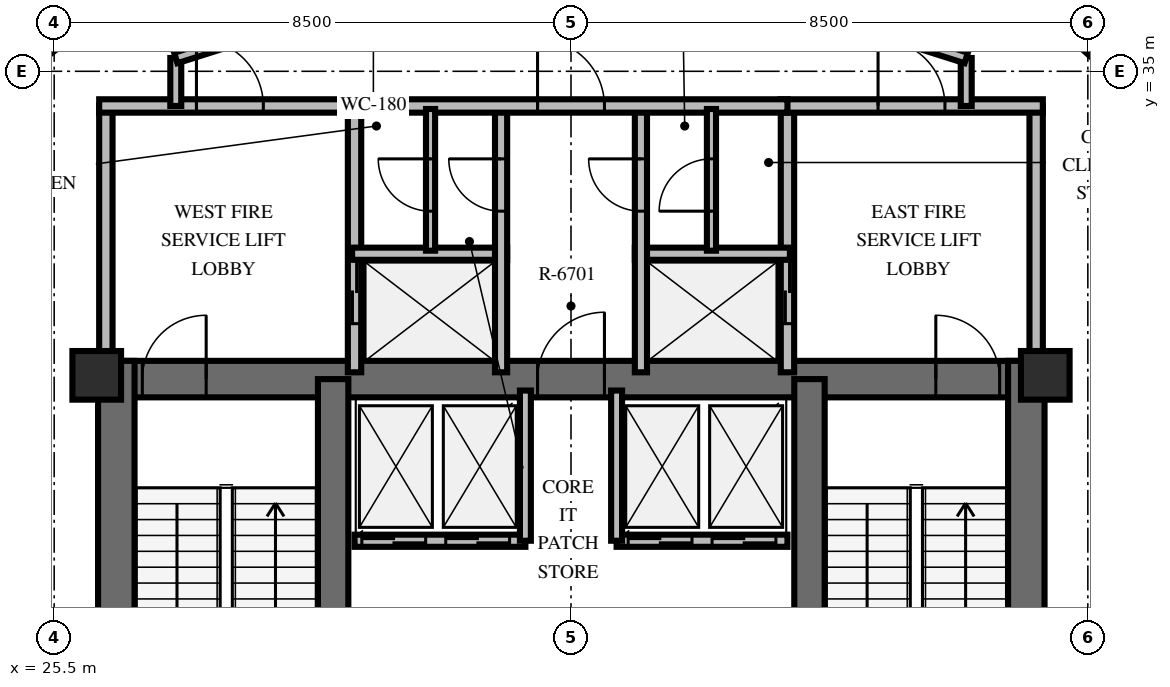
"""IFC4 building model, lengths in metres.
Left out: names, types, materials, properties, quantities, classifications, styles, units other than length and angle.
Written with IfcOpenShell. Run it as: python <this file> out.ifc"""

import sys

from ifc_helpers import new_model, si_unit, direction, frame, frame_2d, origin, origin_2d, place, context, subcontext, project, spatial, rectangle, extrude, element, fill, save


model = new_model("IFC4")
c1 = context("Model", 3, precision=1e-05, world=origin(), true_north=direction((0.0, 1.0)))
c2 = subcontext(c1, "Body", "Model", "MODEL_VIEW")
j1 = project(units=[si_unit("LENGTHUNIT", "METRE"), si_unit("PLANEANGLEUNIT", "RADIAN")], contexts=[c1])
p1 = place(None, origin())
s1 = spatial("IfcSite", under=j1, at=p1, CompositionType="ELEMENT")
p2 = place(p1, origin())
s2 = spatial("IfcBuilding", under=s1, at=p2, CompositionType="ELEMENT")
p3 = place(p2, frame((0.0, 0.0, 270.0)))
s3 = spatial("IfcBuildingStorey", under=s2, at=p3, CompositionType="ELEMENT", Elevation=270.0)
p4 = place(p3, frame((26.222, 29.938, 0.0), z_axis=(0.0, 0.0, 1.0), x_axis=(1.0, 0.0, 0.0)))
e1 = element("IfcWall", 1, at=p4, inside=s3, PredefinedType="SHEAR", context=c2, shape_type="SweptSolid", body=[
    extrude(rectangle(XDim=15.566, YDim=0.6, at=frame_2d((7.783, 0.0))), origin(), (0.0, 0.0, 1.0), 3.6),
])
p5 = place(p4, frame((0.728, 0.0, 0.0)))
e2 = element("IfcOpeningElement", 2, at=p5, cuts=e1, PredefinedType="OPENING", context=c2, shape_type="SweptSolid", body=[
    extrude(rectangle(XDim=1.05, YDim=2.15, at=frame_2d((0.525, 1.075))), frame((0.0, 0.31, 0.0), z_axis=(0.0, -1.0, 0.0), x_axis=(1.0, 0.0, 0.0)), (0.0, 0.0, 1.0), 0.62),
])
p6 = place(p4, frame((13.778, 0.0, 0.0)))
e3 = element("IfcOpeningElement", 3, at=p6, cuts=e1, PredefinedType="OPENING", context=c2, shape_type="SweptSolid", body=[
    extrude(rectangle(XDim=1.05, YDim=2.15, at=frame_2d((0.525, 1.075))), frame((0.0, 0.31, 0.0), z_axis=(0.0, -1.0, 0.0), x_axis=(1.0, 0.0, 0.0)), (0.0, 0.0, 1.0), 0.62),
])
p7 = place(p4, frame((7.228, 0.0, 0.0)))
e4 = element("IfcOpeningElement", 4, at=p7, cuts=e1, PredefinedType="OPENING", context=c2, shape_type="SweptSolid", body=[
    extrude(rectangle(XDim=1.1, YDim=2.15, at=frame_2d((0.55, 1.075))), frame((0.0, 0.31, 0.0), z_axis=(0.0, -1.0, 0.0), x_axis=(1.0, 0.0, 0.0)), (0.0, 0.0, 1.0), 0.62),
])
for number, where, z_axis, x_axis in (
    (5, (26.522, 19.962, 0.0), (0.0, 0.0, 1.0), (0.0, 1.0, 0.0)),
    (6, (41.488, 19.962, 0.0), (0.0, 0.0, 1.0), (0.0, 1.0, 0.0)),
):
    element("IfcWall", number, at=place(p3, frame(where, z_axis=z_axis, x_axis=x_axis)), inside=s3, PredefinedType="SHEAR", context=c2, shape_type="SweptSolid", body=[
        extrude(rectangle(XDim=10.276, YDim=0.6, at=frame_2d((5.138, 0.0))), origin(), (0.0, 0.0, 1.0), 3.6),
    ])
for number, where, z_axis, x_axis in (
    (7, (30.088, 20.262, 0.0), (0.0, 0.0, 1.0), (0.0, 1.0, 0.0)),
    (8, (37.922, 20.262, 0.0), (0.0, 0.0, 1.0), (0.0, 1.0, 0.0)),
):
    element("IfcWall", number, at=place(p3, frame(where, z_axis=z_axis, x_axis=x_axis)), inside=s3, PredefinedType="SHEAR", context=c2, shape_type="SweptSolid", body=[
        extrude(rectangle(XDim=9.676, YDim=0.5, at=frame_2d((4.838, 0.0))), origin(), (0.0, 0.0, 1.0), 3.6),
    ])
for number, where, z_axis, x_axis in (
    (9, (26.2, 30.0, 0.0), (0.0, 0.0, 1.0), (1.0, 0.0, 0.0)),
    (10, (41.8, 30.0, 0.0), (0.0, 0.0, 1.0), (1.0, 0.0, 0.0)),
):
    element("IfcColumn", number, at=place(p3, frame(where, z_axis=z_axis, x_axis=x_axis)), inside=s3, PredefinedType="PILASTER", context=c2, shape_type="SweptSolid", body=[
        extrude(rectangle(XDim=0.8, YDim=0.8, at=origin_2d()), origin(), (0.0, 0.0, 1.0), 3.6),
    ])
p8 = place(p3, frame((26.35, 30.05, 0.0), z_axis=(0.0, 0.0, 1.0), x_axis=(0.0, 1.0, 0.0)))
e11 = element("IfcWall", 11, at=p8, inside=s3, PredefinedType="SOLIDWALL", context=c2, shape_type="SweptSolid", body=[
    extrude(rectangle(XDim=4.38, YDim=0.22, at=frame_2d((2.19, 0.0))), origin(), (0.0, 0.0, 1.0), 2.46),
])
p9 = place(p3, frame((30.44, 30.05, 0.0), z_axis=(0.0, 0.0, 1.0), x_axis=(0.0, 1.0, 0.0)))
e12 = element("IfcWall", 12, at=p9, inside=s3, PredefinedType="SOLIDWALL", context=c2, shape_type="SweptSolid", body=[
    extrude(rectangle(XDim=4.38, YDim=0.22, at=frame_2d((2.19, 0.0))), origin(), (0.0, 0.0, 1.0), 2.46),
])
p10 = place(p9, frame((0.8, 0.0, 0.0)))
e13 = element("IfcOpeningElement", 13, at=p10, cuts=e12, PredefinedType="OPENING", context=c2, shape_type="SweptSolid", body=[
    extrude(rectangle(XDim=1.05, YDim=2.1, at=frame_2d((0.525, 1.05))), frame((0.0, 0.12, 0.0), z_axis=(0.0, -1.0, 0.0), x_axis=(1.0, 0.0, 0.0)), (0.0, 0.0, 1.0), 0.24),
])
p11 = place(p3, frame((26.24, 34.43, 0.0), z_axis=(0.0, 0.0, 1.0), x_axis=(1.0, 0.0, 0.0)))
e14 = element("IfcWall", 14, at=p11, inside=s3, PredefinedType="SOLIDWALL", context=c2, shape_type="SweptSolid", body=[
    extrude(rectangle(XDim=4.31, YDim=0.22, at=frame_2d((2.155, 0.0))), origin(), (0.0, 0.0, 1.0), 2.46),
])
p12 = place(p11, frame((1.6, 0.0, 0.0)))
e15 = element("IfcOpeningElement", 15, at=p12, cuts=e14, PredefinedType="OPENING", context=c2, shape_type="SweptSolid", body=[
    extrude(rectangle(XDim=1.1, YDim=2.15, at=frame_2d((0.55, 1.075))), frame((0.0, 0.12, 0.0), z_axis=(0.0, -1.0, 0.0), x_axis=(1.0, 0.0, 0.0)), (0.0, 0.0, 1.0), 0.24),
])
p13 = place(p3, frame((30.4, 32.0, 0.0), z_axis=(0.0, 0.0, 1.0), x_axis=(1.0, 0.0, 0.0)))
e16 = element("IfcWall", 16, at=p13, inside=s3, PredefinedType="SOLIDWALL", context=c2, shape_type="SweptSolid", body=[
    extrude(rectangle(XDim=2.55, YDim=0.2, at=frame_2d((1.275, 0.0))), origin(), (0.0, 0.0, 1.0), 2.46),
])
p14 = place(p3, frame((32.85, 30.05, 0.0), z_axis=(0.0, 0.0, 1.0), x_axis=(0.0, 1.0, 0.0)))
e17 = element("IfcWall", 17, at=p14, inside=s3, PredefinedType="SOLIDWALL", context=c2, shape_type="SweptSolid", body=[
    extrude(rectangle(XDim=4.38, YDim=0.2, at=frame_2d((2.19, 0.0))), origin(), (0.0, 0.0, 1.0), 2.46),
])
p15 = place(p14, frame((2.65, 0.0, 0.0)))
e18 = element("IfcOpeningElement", 18, at=p15, cuts=e17, PredefinedType="OPENING", context=c2, shape_type="SweptSolid", body=[
    extrude(rectangle(XDim=0.86, YDim=2.05, at=frame_2d((0.43, 1.025))), frame((0.0, 0.11, 0.0), z_axis=(0.0, -1.0, 0.0), x_axis=(1.0, 0.0, 0.0)), (0.0, 0.0, 1.0), 0.22),
])
p16 = place(p3, frame((37.56, 30.05, 0.0), z_axis=(0.0, 0.0, 1.0), x_axis=(0.0, 1.0, 0.0)))
e19 = element("IfcWall", 19, at=p16, inside=s3, PredefinedType="SOLIDWALL", context=c2, shape_type="SweptSolid", body=[
    extrude(rectangle(XDim=4.38, YDim=0.22, at=frame_2d((2.19, 0.0))), origin(), (0.0, 0.0, 1.0), 2.46),
])
p17 = place(p16, frame((0.8, 0.0, 0.0)))
e20 = element("IfcOpeningElement", 20, at=p17, cuts=e19, PredefinedType="OPENING", context=c2, shape_type="SweptSolid", body=[
    extrude(rectangle(XDim=1.05, YDim=2.1, at=frame_2d((0.525, 1.05))), frame((0.0, 0.12, 0.0), z_axis=(0.0, -1.0, 0.0), x_axis=(1.0, 0.0, 0.0)), (0.0, 0.0, 1.0), 0.24),
])
p18 = place(p3, frame((41.65, 30.05, 0.0), z_axis=(0.0, 0.0, 1.0), x_axis=(0.0, 1.0, 0.0)))
e21 = element("IfcWall", 21, at=p18, inside=s3, PredefinedType="SOLIDWALL", context=c2, shape_type="SweptSolid", body=[
    extrude(rectangle(XDim=4.38, YDim=0.22, at=frame_2d((2.19, 0.0))), origin(), (0.0, 0.0, 1.0), 2.46),
])
p19 = place(p3, frame((37.45, 34.43, 0.0), z_axis=(0.0, 0.0, 1.0), x_axis=(1.0, 0.0, 0.0)))
e22 = element("IfcWall", 22, at=p19, inside=s3, PredefinedType="SOLIDWALL", context=c2, shape_type="SweptSolid", body=[
    extrude(rectangle(XDim=4.31, YDim=0.22, at=frame_2d((2.155, 0.0))), origin(), (0.0, 0.0, 1.0), 2.46),
])
p20 = place(p19, frame((1.6, 0.0, 0.0)))
e23 = element("IfcOpeningElement", 23, at=p20, cuts=e22, PredefinedType="OPENING", context=c2, shape_type="SweptSolid", body=[
    extrude(rectangle(XDim=1.1, YDim=2.15, at=frame_2d((0.55, 1.075))), frame((0.0, 0.12, 0.0), z_axis=(0.0, -1.0, 0.0), x_axis=(1.0, 0.0, 0.0)), (0.0, 0.0, 1.0), 0.24),
])
p21 = place(p3, frame((35.05, 32.0, 0.0), z_axis=(0.0, 0.0, 1.0), x_axis=(1.0, 0.0, 0.0)))
e24 = element("IfcWall", 24, at=p21, inside=s3, PredefinedType="SOLIDWALL", context=c2, shape_type="SweptSolid", body=[
    extrude(rectangle(XDim=2.55, YDim=0.2, at=frame_2d((1.275, 0.0))), origin(), (0.0, 0.0, 1.0), 2.46),
])
p22 = place(p3, frame((35.15, 30.05, 0.0), z_axis=(0.0, 0.0, 1.0), x_axis=(0.0, 1.0, 0.0)))
e25 = element("IfcWall", 25, at=p22, inside=s3, PredefinedType="SOLIDWALL", context=c2, shape_type="SweptSolid", body=[
    extrude(rectangle(XDim=4.38, YDim=0.2, at=frame_2d((2.19, 0.0))), origin(), (0.0, 0.0, 1.0), 2.46),
])
p23 = place(p22, frame((2.65, 0.0, 0.0)))
e26 = element("IfcOpeningElement", 26, at=p23, cuts=e25, PredefinedType="OPENING", context=c2, shape_type="SweptSolid", body=[
    extrude(rectangle(XDim=0.86, YDim=2.05, at=frame_2d((0.43, 1.025))), frame((0.0, 0.11, 0.0), z_axis=(0.0, -1.0, 0.0), x_axis=(1.0, 0.0, 0.0)), (0.0, 0.0, 1.0), 0.22),
])
p24 = place(p3, frame((30.44, 34.43, 0.0), z_axis=(0.0, 0.0, 1.0), x_axis=(1.0, 0.0, 0.0)))
e27 = element("IfcWall", 27, at=p24, inside=s3, PredefinedType="SOLIDWALL", context=c2, shape_type="SweptSolid", body=[
    extrude(rectangle(XDim=7.12, YDim=0.22, at=frame_2d((3.56, 0.0))), origin(), (0.0, 0.0, 1.0), 2.46),
])
p25 = place(p24, frame((3.01, 0.0, 0.0)))
e28 = element("IfcOpeningElement", 28, at=p25, cuts=e27, PredefinedType="OPENING", context=c2, shape_type="SweptSolid", body=[
    extrude(rectangle(XDim=1.1, YDim=2.15, at=frame_2d((0.55, 1.075))), frame((0.0, 0.12, 0.0), z_axis=(0.0, -1.0, 0.0), x_axis=(1.0, 0.0, 0.0)), (0.0, 0.0, 1.0), 0.24),
])
p26 = place(p3, frame((31.69, 32.05, 0.0), z_axis=(0.0, 0.0, 1.0), x_axis=(0.0, 1.0, 0.0)))
e29 = element("IfcWall", 29, at=p26, inside=s3, PredefinedType="PARTITIONING", context=c2, shape_type="SweptSolid", body=[
    extrude(rectangle(XDim=2.33, YDim=0.15, at=frame_2d((1.165, 0.0))), origin(), (0.0, 0.0, 1.0), 2.46),
])
p27 = place(p26, frame((0.65, 0.0, 0.0)))
e30 = element("IfcOpeningElement", 30, at=p27, cuts=e29, PredefinedType="OPENING", context=c2, shape_type="SweptSolid", body=[
    extrude(rectangle(XDim=0.86, YDim=2.05, at=frame_2d((0.43, 1.025))), frame((0.0, 0.085, 0.0), z_axis=(0.0, -1.0, 0.0), x_axis=(1.0, 0.0, 0.0)), (0.0, 0.0, 1.0), 0.17),
])
p28 = place(p3, frame((36.31, 32.05, 0.0), z_axis=(0.0, 0.0, 1.0), x_axis=(0.0, 1.0, 0.0)))
e31 = element("IfcWall", 31, at=p28, inside=s3, PredefinedType="PARTITIONING", context=c2, shape_type="SweptSolid", body=[
    extrude(rectangle(XDim=2.33, YDim=0.15, at=frame_2d((1.165, 0.0))), origin(), (0.0, 0.0, 1.0), 2.46),
])
p29 = place(p28, frame((0.65, 0.0, 0.0)))
e32 = element("IfcOpeningElement", 32, at=p29, cuts=e31, PredefinedType="OPENING", context=c2, shape_type="SweptSolid", body=[
    extrude(rectangle(XDim=0.86, YDim=2.05, at=frame_2d((0.43, 1.025))), frame((0.0, 0.085, 0.0), z_axis=(0.0, -1.0, 0.0), x_axis=(1.0, 0.0, 0.0)), (0.0, 0.0, 1.0), 0.17),
])
p30 = place(p3, frame((30.44, 27.28, 0.0), z_axis=(0.0, 0.0, 1.0), x_axis=(1.0, 0.0, 0.0)))
e33 = element("IfcWall", 33, at=p30, inside=s3, PredefinedType="SOLIDWALL", context=c2, shape_type="SweptSolid", body=[
    extrude(rectangle(XDim=2.81, YDim=0.2, at=frame_2d((1.405, 0.0))), origin(), (0.0, 0.0, 1.0), 2.46),
])
p31 = place(p30, frame((0.12, 0.0, 0.0)))
e34 = element("IfcOpeningElement", 34, at=p31, cuts=e33, PredefinedType="OPENING", context=c2, shape_type="SweptSolid", body=[
    extrude(rectangle(XDim=1.05, YDim=2.1, at=frame_2d((0.525, 1.05))), frame((0.0, 0.11, 0.0), z_axis=(0.0, -1.0, 0.0), x_axis=(1.0, 0.0, 0.0)), (0.0, 0.0, 1.0), 0.22),
])
p32 = place(p30, frame((1.5, 0.0, 0.0)))
e35 = element("IfcOpeningElement", 35, at=p32, cuts=e33, PredefinedType="OPENING", context=c2, shape_type="SweptSolid", body=[
    extrude(rectangle(XDim=1.05, YDim=2.1, at=frame_2d((0.525, 1.05))), frame((0.0, 0.11, 0.0), z_axis=(0.0, -1.0, 0.0), x_axis=(1.0, 0.0, 0.0)), (0.0, 0.0, 1.0), 0.22),
])
p33 = place(p3, frame((33.25, 27.28, 0.0), z_axis=(0.0, 0.0, 1.0), x_axis=(0.0, 1.0, 0.0)))
e36 = element("IfcWall", 36, at=p33, inside=s3, PredefinedType="SOLIDWALL", context=c2, shape_type="SweptSolid", body=[
    extrude(rectangle(XDim=2.47, YDim=0.18, at=frame_2d((1.235, 0.0))), origin(), (0.0, 0.0, 1.0), 2.46),
])
p34 = place(p3, frame((34.75, 27.28, 0.0), z_axis=(0.0, 0.0, 1.0), x_axis=(1.0, 0.0, 0.0)))
e37 = element("IfcWall", 37, at=p34, inside=s3, PredefinedType="SOLIDWALL", context=c2, shape_type="SweptSolid", body=[
    extrude(rectangle(XDim=2.81, YDim=0.2, at=frame_2d((1.405, 0.0))), origin(), (0.0, 0.0, 1.0), 2.46),
])
p35 = place(p34, frame((0.19, 0.0, 0.0)))
e38 = element("IfcOpeningElement", 38, at=p35, cuts=e37, PredefinedType="OPENING", context=c2, shape_type="SweptSolid", body=[
    extrude(rectangle(XDim=1.05, YDim=2.1, at=frame_2d((0.525, 1.05))), frame((0.0, 0.11, 0.0), z_axis=(0.0, -1.0, 0.0), x_axis=(1.0, 0.0, 0.0)), (0.0, 0.0, 1.0), 0.22),
])
p36 = place(p34, frame((1.57, 0.0, 0.0)))
e39 = element("IfcOpeningElement", 39, at=p36, cuts=e37, PredefinedType="OPENING", context=c2, shape_type="SweptSolid", body=[
    extrude(rectangle(XDim=1.05, YDim=2.1, at=frame_2d((0.525, 1.05))), frame((0.0, 0.11, 0.0), z_axis=(0.0, -1.0, 0.0), x_axis=(1.0, 0.0, 0.0)), (0.0, 0.0, 1.0), 0.22),
])
p37 = place(p3, frame((34.75, 27.28, 0.0), z_axis=(0.0, 0.0, 1.0), x_axis=(0.0, 1.0, 0.0)))
e40 = element("IfcWall", 40, at=p37, inside=s3, PredefinedType="SOLIDWALL", context=c2, shape_type="SweptSolid", body=[
    extrude(rectangle(XDim=2.47, YDim=0.18, at=frame_2d((1.235, 0.0))), origin(), (0.0, 0.0, 1.0), 2.46),
])
for number, where, z_axis, x_axis in (
    (41, (27.5, 34.43, 0.0), (0.0, 0.0, 1.0), (0.0, 1.0, 0.0)),
    (42, (40.5, 35.219, 0.0), (0.0, 0.0, 1.0), (0.0, -1.0, 0.0)),
):
    element("IfcWall", number, at=place(p3, frame(where, z_axis=z_axis, x_axis=x_axis)), inside=s3, PredefinedType="PARTITIONING", context=c2, shape_type="SweptSolid", body=[
        extrude(rectangle(XDim=0.789, YDim=0.18, at=frame_2d((0.395, 0.0))), origin(), (0.0, 0.0, 1.0), 2.46),
    ])
p38 = place(p3, frame((27.5, 35.219, 0.0), z_axis=(0.0, 0.0, 1.0), x_axis=(0.953228121756, 0.302251795518, 0.0)))
e43 = element("IfcWall", 43, at=p38, inside=s3, PredefinedType="PARTITIONING", context=c2, shape_type="SweptSolid", body=[
    extrude(rectangle(XDim=6.819, YDim=0.18, at=frame_2d((3.409, 0.0))), origin(), (0.0, 0.0, 1.0), 2.46),
])
p39 = place(p38, frame((2.86, 0.0, 0.0)))
e44 = element("IfcOpeningElement", 44, at=p39, cuts=e43, PredefinedType="OPENING", context=c2, shape_type="SweptSolid", body=[
    extrude(rectangle(XDim=1.1, YDim=2.15, at=frame_2d((0.55, 1.075))), frame((0.0, 0.1, 0.0), z_axis=(0.0, -1.0, 0.0), x_axis=(1.0, 0.0, 0.0)), (0.0, 0.0, 1.0), 0.2),
])
p40 = place(p3, frame((34.0, 37.28, 0.0), z_axis=(0.0, 0.0, 1.0), x_axis=(0.953228121756, -0.302251795518, 0.0)))
e45 = element("IfcWall", 45, at=p40, inside=s3, PredefinedType="PARTITIONING", context=c2, shape_type="SweptSolid", body=[
    extrude(rectangle(XDim=6.819, YDim=0.18, at=frame_2d((3.409, 0.0))), origin(), (0.0, 0.0, 1.0), 2.46),
])
p41 = place(p40, frame((2.86, 0.0, 0.0)))
e46 = element("IfcOpeningElement", 46, at=p41, cuts=e45, PredefinedType="OPENING", context=c2, shape_type="SweptSolid", body=[
    extrude(rectangle(XDim=1.1, YDim=2.15, at=frame_2d((0.55, 1.075))), frame((0.0, 0.1, 0.0), z_axis=(0.0, -1.0, 0.0), x_axis=(1.0, 0.0, 0.0)), (0.0, 0.0, 1.0), 0.2),
])
p42 = place(p3, frame((44.149, 33.915, 0.0), z_axis=(0.0, 0.0, 1.0), x_axis=(-0.742573984857, 0.669764045775, 0.0)))
e47 = element("IfcWall", 47, at=p42, inside=s3, PredefinedType="PARTITIONING", context=c2, shape_type="SweptSolid", body=[
    extrude(rectangle(XDim=4.47, YDim=0.18, at=frame_2d((2.235, 0.0))), origin(), (0.0, 0.0, 1.0), 2.46),
])
p43 = place(p3, frame((45.607, 35.052, 0.0), z_axis=(0.0, 0.0, 1.0), x_axis=(-0.742559943457, 0.669779613286, 0.0)))
e48 = element("IfcWall", 48, at=p43, inside=s3, PredefinedType="PARTITIONING", context=c2, shape_type="SweptSolid", body=[
    extrude(rectangle(XDim=5.112, YDim=0.125, at=frame_2d((2.556, 0.0))), origin(), (0.0, 0.0, 1.0), 2.46),
])
p44 = place(p3, frame((27.968, 37.369, 0.0), z_axis=(0.0, 0.0, 1.0), x_axis=(-0.78855157168, -0.614968632371, 0.0)))
e49 = element("IfcWall", 49, at=p44, inside=s3, PredefinedType="PARTITIONING", context=c2, shape_type="SweptSolid", body=[
    extrude(rectangle(XDim=4.47, YDim=0.18, at=frame_2d((2.235, 0.0))), origin(), (0.0, 0.0, 1.0), 2.46),
])
p45 = place(p5, origin())
e50 = element("IfcDoor", 50, at=p45, inside=s3, OperationType="SINGLE_SWING_RIGHT", PredefinedType="DOOR", context=c2, shape_type="SweptSolid", body=[
    extrude(rectangle(XDim=1.05, YDim=2.15, at=frame_2d((0.525, 1.075))), frame((0.0, 0.025, 0.0), z_axis=(0.0, -1.0, 0.0), x_axis=(1.0, 0.0, 0.0)), (0.0, 0.0, 1.0), 0.05),
])
fill(e2, e50)
p46 = place(p6, origin())
e51 = element("IfcDoor", 51, at=p46, inside=s3, OperationType="SINGLE_SWING_LEFT", PredefinedType="DOOR", context=c2, shape_type="SweptSolid", body=[
    extrude(rectangle(XDim=1.05, YDim=2.15, at=frame_2d((0.525, 1.075))), frame((0.0, 0.025, 0.0), z_axis=(0.0, -1.0, 0.0), x_axis=(1.0, 0.0, 0.0)), (0.0, 0.0, 1.0), 0.05),
])
fill(e3, e51)
p47 = place(p7, origin())
e52 = element("IfcDoor", 52, at=p47, inside=s3, OperationType="SINGLE_SWING_RIGHT", PredefinedType="DOOR", context=c2, shape_type="SweptSolid", body=[
    extrude(rectangle(XDim=1.1, YDim=2.15, at=frame_2d((0.55, 1.075))), frame((0.0, 0.025, 0.0), z_axis=(0.0, -1.0, 0.0), x_axis=(1.0, 0.0, 0.0)), (0.0, 0.0, 1.0), 0.05),
])
fill(e4, e52)
p48 = place(p12, origin())
e53 = element("IfcDoor", 53, at=p48, inside=s3, OperationType="SINGLE_SWING_LEFT", PredefinedType="DOOR", context=c2, shape_type="SweptSolid", body=[
    extrude(rectangle(XDim=1.1, YDim=2.15, at=frame_2d((0.55, 1.075))), frame((0.0, 0.025, 0.0), z_axis=(0.0, -1.0, 0.0), x_axis=(1.0, 0.0, 0.0)), (0.0, 0.0, 1.0), 0.05),
])
fill(e15, e53)
p49 = place(p10, origin())
e54 = element("IfcDoor", 54, at=p49, inside=s3, OperationType="DOUBLE_DOOR_SLIDING", PredefinedType="USERDEFINED", context=c2, shape_type="SweptSolid", body=[
    extrude(rectangle(XDim=1.05, YDim=2.1, at=frame_2d((0.525, 1.05))), frame((0.0, 0.025, 0.0), z_axis=(0.0, -1.0, 0.0), x_axis=(1.0, 0.0, 0.0)), (0.0, 0.0, 1.0), 0.05),
])
fill(e13, e54)
p50 = place(p15, origin())
e55 = element("IfcDoor", 55, at=p50, inside=s3, OperationType="SINGLE_SWING_RIGHT", PredefinedType="TRAPDOOR", context=c2, shape_type="SweptSolid", body=[
    extrude(rectangle(XDim=0.86, YDim=2.05, at=frame_2d((0.43, 1.025))), frame((0.0, 0.025, 0.0), z_axis=(0.0, -1.0, 0.0), x_axis=(1.0, 0.0, 0.0)), (0.0, 0.0, 1.0), 0.05),
])
fill(e18, e55)
p51 = place(p20, origin())
e56 = element("IfcDoor", 56, at=p51, inside=s3, OperationType="SINGLE_SWING_LEFT", PredefinedType="DOOR", context=c2, shape_type="SweptSolid", body=[
    extrude(rectangle(XDim=1.1, YDim=2.15, at=frame_2d((0.55, 1.075))), frame((0.0, 0.025, 0.0), z_axis=(0.0, -1.0, 0.0), x_axis=(1.0, 0.0, 0.0)), (0.0, 0.0, 1.0), 0.05),
])
fill(e23, e56)
p52 = place(p17, origin())
e57 = element("IfcDoor", 57, at=p52, inside=s3, OperationType="DOUBLE_DOOR_SLIDING", PredefinedType="USERDEFINED", context=c2, shape_type="SweptSolid", body=[
    extrude(rectangle(XDim=1.05, YDim=2.1, at=frame_2d((0.525, 1.05))), frame((0.0, 0.025, 0.0), z_axis=(0.0, -1.0, 0.0), x_axis=(1.0, 0.0, 0.0)), (0.0, 0.0, 1.0), 0.05),
])
fill(e20, e57)
p53 = place(p23, origin())
e58 = element("IfcDoor", 58, at=p53, inside=s3, OperationType="SINGLE_SWING_RIGHT", PredefinedType="TRAPDOOR", context=c2, shape_type="SweptSolid", body=[
    extrude(rectangle(XDim=0.86, YDim=2.05, at=frame_2d((0.43, 1.025))), frame((0.0, 0.025, 0.0), z_axis=(0.0, -1.0, 0.0), x_axis=(1.0, 0.0, 0.0)), (0.0, 0.0, 1.0), 0.05),
])
fill(e26, e58)
p54 = place(p25, origin())
e59 = element("IfcDoor", 59, at=p54, inside=s3, OperationType="SINGLE_SWING_LEFT", PredefinedType="DOOR", context=c2, shape_type="SweptSolid", body=[
    extrude(rectangle(XDim=1.1, YDim=2.15, at=frame_2d((0.55, 1.075))), frame((0.0, 0.025, 0.0), z_axis=(0.0, -1.0, 0.0), x_axis=(1.0, 0.0, 0.0)), (0.0, 0.0, 1.0), 0.05),
])
fill(e28, e59)
p55 = place(p27, origin())
e60 = element("IfcDoor", 60, at=p55, inside=s3, OperationType="SINGLE_SWING_RIGHT", PredefinedType="TRAPDOOR", context=c2, shape_type="SweptSolid", body=[
    extrude(rectangle(XDim=0.86, YDim=2.05, at=frame_2d((0.43, 1.025))), frame((0.0, 0.025, 0.0), z_axis=(0.0, -1.0, 0.0), x_axis=(1.0, 0.0, 0.0)), (0.0, 0.0, 1.0), 0.05),
])
fill(e30, e60)
p56 = place(p29, origin())
e61 = element("IfcDoor", 61, at=p56, inside=s3, OperationType="SINGLE_SWING_LEFT", PredefinedType="TRAPDOOR", context=c2, shape_type="SweptSolid", body=[
    extrude(rectangle(XDim=0.86, YDim=2.05, at=frame_2d((0.43, 1.025))), frame((0.0, 0.025, 0.0), z_axis=(0.0, -1.0, 0.0), x_axis=(1.0, 0.0, 0.0)), (0.0, 0.0, 1.0), 0.05),
])
fill(e32, e61)
p57 = place(p31, origin())
e62 = element("IfcDoor", 62, at=p57, inside=s3, OperationType="DOUBLE_DOOR_SLIDING", PredefinedType="USERDEFINED", context=c2, shape_type="SweptSolid", body=[
    extrude(rectangle(XDim=1.05, YDim=2.1, at=frame_2d((0.525, 1.05))), frame((0.0, 0.025, 0.0), z_axis=(0.0, -1.0, 0.0), x_axis=(1.0, 0.0, 0.0)), (0.0, 0.0, 1.0), 0.05),
])
fill(e34, e62)
p58 = place(p32, origin())
e63 = element("IfcDoor", 63, at=p58, inside=s3, OperationType="DOUBLE_DOOR_SLIDING", PredefinedType="USERDEFINED", context=c2, shape_type="SweptSolid", body=[
    extrude(rectangle(XDim=1.05, YDim=2.1, at=frame_2d((0.525, 1.05))), frame((0.0, 0.025, 0.0), z_axis=(0.0, -1.0, 0.0), x_axis=(1.0, 0.0, 0.0)), (0.0, 0.0, 1.0), 0.05),
])
fill(e35, e63)
p59 = place(p35, origin())
e64 = element("IfcDoor", 64, at=p59, inside=s3, OperationType="DOUBLE_DOOR_SLIDING", PredefinedType="USERDEFINED", context=c2, shape_type="SweptSolid", body=[
    extrude(rectangle(XDim=1.05, YDim=2.1, at=frame_2d((0.525, 1.05))), frame((0.0, 0.025, 0.0), z_axis=(0.0, -1.0, 0.0), x_axis=(1.0, 0.0, 0.0)), (0.0, 0.0, 1.0), 0.05),
])
fill(e38, e64)
p60 = place(p36, origin())
e65 = element("IfcDoor", 65, at=p60, inside=s3, OperationType="DOUBLE_DOOR_SLIDING", PredefinedType="USERDEFINED", context=c2, shape_type="SweptSolid", body=[
    extrude(rectangle(XDim=1.05, YDim=2.1, at=frame_2d((0.525, 1.05))), frame((0.0, 0.025, 0.0), z_axis=(0.0, -1.0, 0.0), x_axis=(1.0, 0.0, 0.0)), (0.0, 0.0, 1.0), 0.05),
])
fill(e39, e65)
save(model, sys.argv[1])
